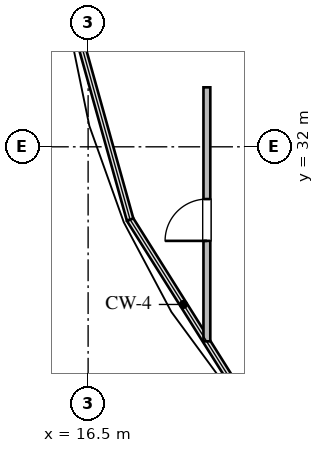
"""IFC4 building model, lengths in metres.
Left out: names, types, materials, properties, quantities, classifications, styles, units other than length and angle.
Written with IfcOpenShell. Run it as: python <this file> out.ifc"""

import sys

from ifc_helpers import new_model, si_unit, direction, frame, frame_2d, origin, place, context, subcontext, project, spatial, rectangle, extrude, element, fill, save


model = new_model("IFC4")
c1 = context("Model", 3, precision=1e-05, world=origin(), true_north=direction((0.0, 1.0)))
c2 = subcontext(c1, "Body", "Model", "MODEL_VIEW")
j1 = project(units=[si_unit("LENGTHUNIT", "METRE"), si_unit("PLANEANGLEUNIT", "RADIAN")], contexts=[c1])
p1 = place(None, origin())
s1 = spatial("IfcSite", under=j1, at=p1, CompositionType="ELEMENT")
p2 = place(p1, origin())
s2 = spatial("IfcBuilding", under=s1, at=p2, CompositionType="ELEMENT")
p3 = place(p2, frame((0.0, 0.0, 258.6)))
s3 = spatial("IfcBuildingStorey", under=s2, at=p3, CompositionType="ELEMENT", Elevation=258.6)
p4 = place(p3, frame((19.625, 26.881, 0.0), z_axis=(0.0, 0.0, 1.0), x_axis=(0.0, 1.0, 0.0)))
e1 = element("IfcWall", 1, at=p4, inside=s3, PredefinedType="PARTITIONING", context=c2, shape_type="SweptSolid", body=[
    extrude(rectangle(XDim=6.684, YDim=0.18, at=frame_2d((3.342, 0.0))), origin(), (0.0, 0.0, 1.0), 3.017),
])
p5 = place(p4, frame((2.644, 0.0, 0.0)))
e2 = element("IfcOpeningElement", 2, at=p5, cuts=e1, PredefinedType="OPENING", context=c2, shape_type="SweptSolid", body=[
    extrude(rectangle(XDim=1.1, YDim=2.1, at=frame_2d((0.55, 1.05))), frame((0.0, 0.1, 0.0), z_axis=(0.0, -1.0, 0.0), x_axis=(1.0, 0.0, 0.0)), (0.0, 0.0, 1.0), 0.2),
])
p6 = place(p5, origin())
e3 = element("IfcDoor", 3, at=p6, inside=s3, OperationType="SINGLE_SWING_LEFT", PredefinedType="DOOR", context=c2, shape_type="SweptSolid", body=[
    extrude(rectangle(XDim=1.1, YDim=2.1, at=frame_2d((0.55, 1.05))), frame((0.0, 0.025, 0.0), z_axis=(0.0, -1.0, 0.0), x_axis=(1.0, 0.0, 0.0)), (0.0, 0.0, 1.0), 0.05),
])
fill(e2, e3)
save(model, sys.argv[1])
